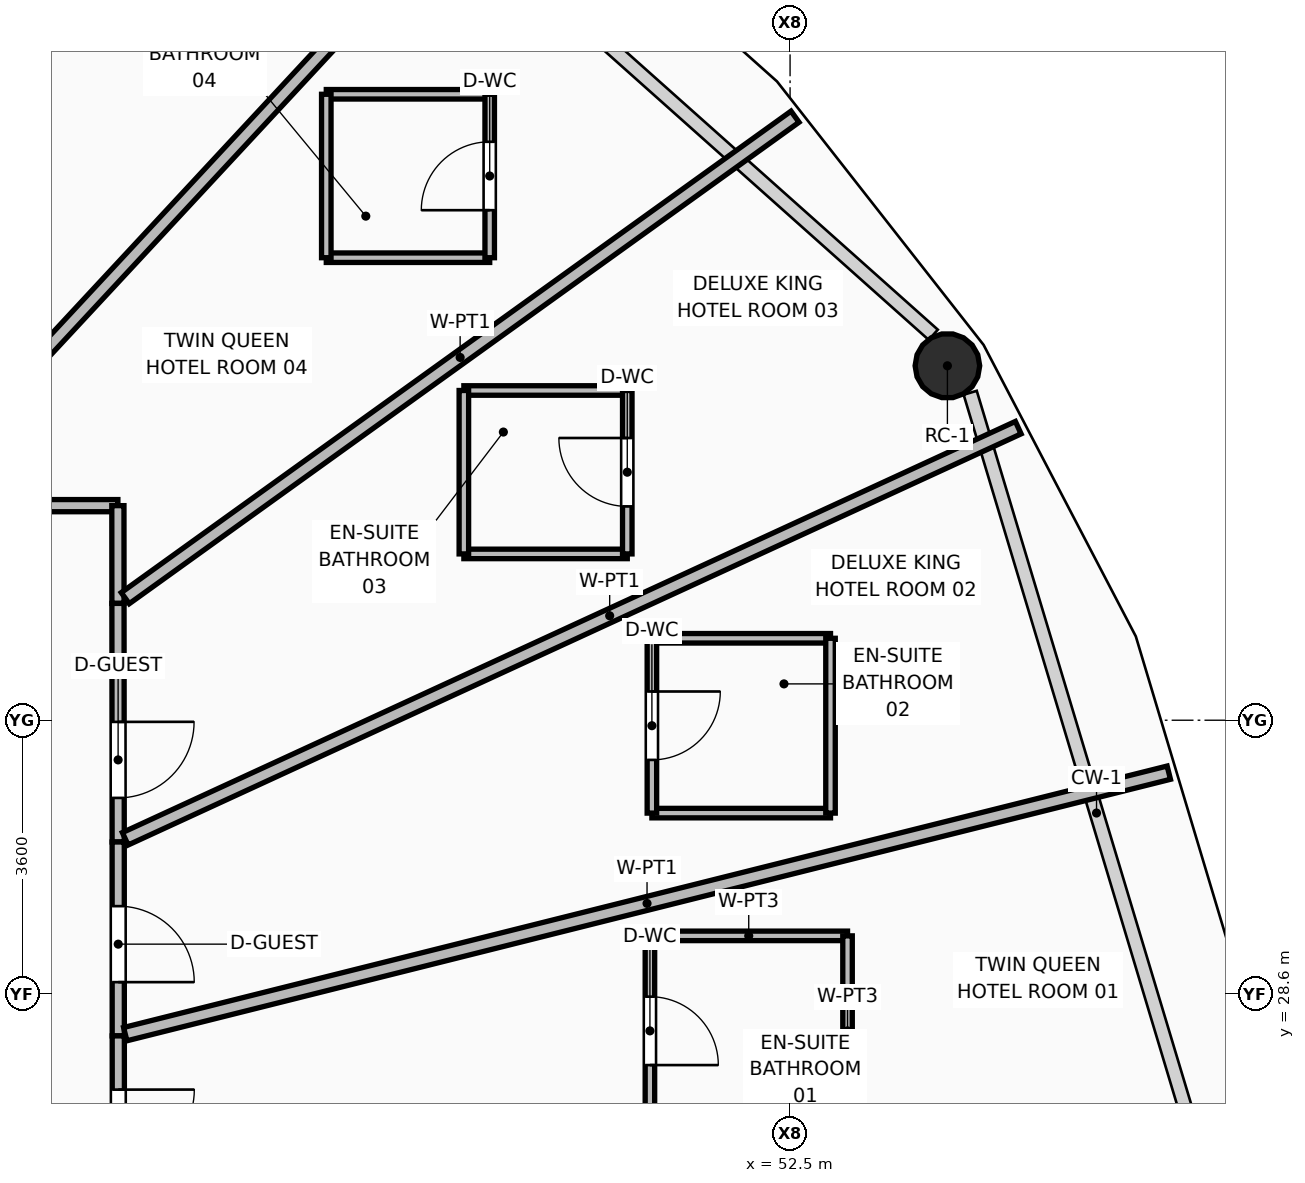
"""IFC4 building model, lengths in metres.
Left out: names, types, materials, properties, quantities, classifications, styles, units other than length and angle.
Written with IfcOpenShell. Run it as: python <this file> out.ifc"""

import sys

from ifc_helpers import new_model, si_unit, direction, frame, frame_2d, origin, origin_2d, place, context, subcontext, project, spatial, rectangle, hollow_circle, extrude, element, fill, save


model = new_model("IFC4")
c1 = context("Model", 3, precision=1e-05, world=origin(), true_north=direction((0.0, 1.0)))
c2 = subcontext(c1, "Body", "Model", "MODEL_VIEW")
j1 = project(units=[si_unit("LENGTHUNIT", "METRE"), si_unit("PLANEANGLEUNIT", "RADIAN")], contexts=[c1])
p1 = place(None, origin())
s1 = spatial("IfcSite", under=j1, at=p1, CompositionType="ELEMENT")
p2 = place(p1, origin())
s2 = spatial("IfcBuilding", under=s1, at=p2, CompositionType="ELEMENT")
p3 = place(p2, frame((0.0, 0.0, 53.25)))
s3 = spatial("IfcBuildingStorey", under=s2, at=p3, CompositionType="ELEMENT", Elevation=53.25)
p4 = place(p3, frame((54.57, 36.863, 0.0), z_axis=(0.192223999714, 0.099016391655, 0.976343017652), x_axis=(-0.45792701067, 0.888989793473, 0.0)))
e1 = element("IfcColumn", 1, at=p4, inside=s3, PredefinedType="COLUMN", context=c2, shape_type="SweptSolid", body=[
    extrude(hollow_circle(Radius=0.425, WallThickness=0.04, at=origin_2d()), origin(), (0.0, 0.0, 1.0), 3.656),
])
p5 = place(p3, frame((40.808, 35.023, 0.0), z_axis=(0.0, 0.0, 1.0), x_axis=(1.0, 0.0, 0.0)))
e2 = element("IfcWall", 2, at=p5, inside=s3, PredefinedType="PARTITIONING", context=c2, shape_type="SweptSolid", body=[
    extrude(rectangle(XDim=2.848, YDim=0.16, at=frame_2d((1.424, 0.0))), origin(), (0.0, 0.0, 1.0), 2.928),
])
p6 = place(p5, frame((0.716, 0.0, 0.0)))
e3 = element("IfcOpeningElement", 3, at=p6, cuts=e2, PredefinedType="OPENING", context=c2, shape_type="SweptSolid", body=[
    extrude(rectangle(XDim=1.0, YDim=2.1, at=frame_2d((0.5, 1.05))), frame((0.0, 0.09, 0.0), z_axis=(0.0, -1.0, 0.0), x_axis=(1.0, 0.0, 0.0)), (0.0, 0.0, 1.0), 0.18),
])
p7 = place(p3, frame((43.656, 35.023, 0.0), z_axis=(0.0, 0.0, 1.0), x_axis=(0.000759445386, -0.999999711621, 0.0)))
e4 = element("IfcWall", 4, at=p7, inside=s3, PredefinedType="PARTITIONING", context=c2, shape_type="SweptSolid", body=[
    extrude(rectangle(XDim=1.286, YDim=0.16, at=frame_2d((0.643, 0.0))), origin(), (0.0, 0.0, 1.0), 3.55),
])
p8 = place(p3, frame((43.657, 33.737, 0.0), z_axis=(0.0, 0.0, 1.0), x_axis=(0.000933270709, -0.999999564503, 0.0)))
e5 = element("IfcWall", 5, at=p8, inside=s3, PredefinedType="PARTITIONING", context=c2, shape_type="SweptSolid", body=[
    extrude(rectangle(XDim=3.139, YDim=0.16, at=frame_2d((1.57, 0.0))), origin(), (0.0, 0.0, 1.0), 2.928),
])
p9 = place(p8, frame((1.559, 0.0, 0.0)))
e6 = element("IfcOpeningElement", 6, at=p9, cuts=e5, PredefinedType="OPENING", context=c2, shape_type="SweptSolid", body=[
    extrude(rectangle(XDim=1.0, YDim=2.1, at=frame_2d((0.5, 1.05))), frame((0.0, 0.09, 0.0), z_axis=(0.0, -1.0, 0.0), x_axis=(1.0, 0.0, 0.0)), (0.0, 0.0, 1.0), 0.18),
])
p10 = place(p3, frame((43.66, 30.598, 0.0), z_axis=(0.0, 0.0, 1.0), x_axis=(0.000382848364, -0.999999926714, 0.0)))
e7 = element("IfcWall", 7, at=p10, inside=s3, PredefinedType="PARTITIONING", context=c2, shape_type="SweptSolid", body=[
    extrude(rectangle(XDim=2.551, YDim=0.16, at=frame_2d((1.275, 0.0))), origin(), (0.0, 0.0, 1.0), 3.55),
])
p11 = place(p10, frame((0.844, 0.0, 0.0)))
e8 = element("IfcOpeningElement", 8, at=p11, cuts=e7, PredefinedType="OPENING", context=c2, shape_type="SweptSolid", body=[
    extrude(rectangle(XDim=1.0, YDim=2.1, at=frame_2d((0.5, 1.05))), frame((0.0, 0.09, 0.0), z_axis=(0.0, -1.0, 0.0), x_axis=(1.0, 0.0, 0.0)), (0.0, 0.0, 1.0), 0.18),
])
p12 = place(p3, frame((43.661, 28.047, 0.0), z_axis=(0.0, 0.0, 1.0), x_axis=(0.000964526397, -0.999999534844, 0.0)))
e9 = element("IfcWall", 9, at=p12, inside=s3, PredefinedType="PARTITIONING", context=c2, shape_type="SweptSolid", body=[
    extrude(rectangle(XDim=2.278, YDim=0.16, at=frame_2d((1.139, 0.0))), origin(), (0.0, 0.0, 1.0), 3.55),
])
p13 = place(p12, frame((0.707, 0.0, 0.0)))
e10 = element("IfcOpeningElement", 10, at=p13, cuts=e9, PredefinedType="OPENING", context=c2, shape_type="SweptSolid", body=[
    extrude(rectangle(XDim=1.0, YDim=2.1, at=frame_2d((0.5, 1.05))), frame((0.0, 0.09, 0.0), z_axis=(0.0, -1.0, 0.0), x_axis=(1.0, 0.0, 0.0)), (0.0, 0.0, 1.0), 0.18),
])
p14 = place(p3, frame((43.753, 28.07, 0.0), z_axis=(0.0, 0.0, 1.0), x_axis=(0.970018590768, 0.243030725558, 0.0)))
e11 = element("IfcWall", 11, at=p14, inside=s3, PredefinedType="PARTITIONING", context=c2, shape_type="SweptSolid", body=[
    extrude(rectangle(XDim=14.154, YDim=0.18, at=frame_2d((7.077, 0.0))), origin(), (0.0, 0.0, 1.0), 2.775),
])
p15 = place(p3, frame((43.753, 30.64, 0.0), z_axis=(0.0, 0.0, 1.0), x_axis=(0.908354532473, 0.418200960466, 0.0)))
e12 = element("IfcWall", 12, at=p15, inside=s3, PredefinedType="PARTITIONING", context=c2, shape_type="SweptSolid", body=[
    extrude(rectangle(XDim=12.934, YDim=0.18, at=frame_2d((6.467, 0.0))), origin(), (0.0, 0.0, 1.0), 2.775),
])
p16 = place(p3, frame((43.753, 33.806, 0.0), z_axis=(0.0, 0.0, 1.0), x_axis=(0.812000044836, 0.583657371397, 0.0)))
e13 = element("IfcWall", 13, at=p16, inside=s3, PredefinedType="PARTITIONING", context=c2, shape_type="SweptSolid", body=[
    extrude(rectangle(XDim=10.852, YDim=0.18, at=frame_2d((5.426, 0.0))), origin(), (0.0, 0.0, 1.0), 2.775),
])
p17 = place(p3, frame((40.882, 35.103, 0.0), z_axis=(0.0, 0.0, 1.0), x_axis=(0.680551186201, 0.732700541122, 0.0)))
e14 = element("IfcWall", 14, at=p17, inside=s3, PredefinedType="PARTITIONING", context=c2, shape_type="SweptSolid", body=[
    extrude(rectangle(XDim=11.601, YDim=0.18, at=frame_2d((5.8, 0.0))), origin(), (0.0, 0.0, 1.0), 2.775),
])
p18 = place(p3, frame((37.445, 35.103, 0.0), z_axis=(0.0, 0.0, 1.0), x_axis=(0.507217216193, 0.861818249747, 0.0)))
e15 = element("IfcWall", 15, at=p18, inside=s3, PredefinedType="PARTITIONING", context=c2, shape_type="SweptSolid", body=[
    extrude(rectangle(XDim=13.046, YDim=0.18, at=frame_2d((6.523, 0.0))), origin(), (0.0, 0.0, 1.0), 2.775),
])
p19 = place(p3, frame((50.656, 29.363, 0.0), z_axis=(0.0, 0.0, 1.0), x_axis=(1.0, 0.0, 0.0)))
e16 = element("IfcWall", 16, at=p19, inside=s3, PredefinedType="PARTITIONING", context=c2, shape_type="SweptSolid", body=[
    extrude(rectangle(XDim=2.6, YDim=0.125, at=frame_2d((1.3, 0.0))), origin(), (0.0, 0.0, 1.0), 3.55),
])
p20 = place(p3, frame((50.656, 26.863, 0.0), z_axis=(0.0, 0.0, 1.0), x_axis=(0.0, 1.0, 0.0)))
e17 = element("IfcWall", 17, at=p20, inside=s3, PredefinedType="PARTITIONING", context=c2, shape_type="SweptSolid", body=[
    extrude(rectangle(XDim=2.5, YDim=0.125, at=frame_2d((1.25, 0.0))), origin(), (0.0, 0.0, 1.0), 3.55),
])
p21 = place(p20, frame((0.8, 0.0, 0.0)))
e18 = element("IfcOpeningElement", 18, at=p21, cuts=e17, PredefinedType="OPENING", context=c2, shape_type="SweptSolid", body=[
    extrude(rectangle(XDim=0.9, YDim=2.1, at=frame_2d((0.45, 1.05))), frame((0.0, 0.073, 0.0), z_axis=(0.0, -1.0, 0.0), x_axis=(1.0, 0.0, 0.0)), (0.0, 0.0, 1.0), 0.145),
])
p22 = place(p3, frame((53.256, 26.863, 0.0), z_axis=(0.0, 0.0, 1.0), x_axis=(0.0, 1.0, 0.0)))
e19 = element("IfcWall", 19, at=p22, inside=s3, PredefinedType="PARTITIONING", context=c2, shape_type="SweptSolid", body=[
    extrude(rectangle(XDim=2.5, YDim=0.125, at=frame_2d((1.25, 0.0))), origin(), (0.0, 0.0, 1.0), 3.55),
])
for number, where, z_axis, x_axis in (
    (20, (50.682, 30.978, 0.0), (0.0, 0.0, 1.0), (1.0, 0.0, 0.0)),
    (21, (50.682, 33.278, 0.0), (0.0, 0.0, 1.0), (1.0, 0.0, 0.0)),
):
    element("IfcWall", number, at=place(p3, frame(where, z_axis=z_axis, x_axis=x_axis)), inside=s3, PredefinedType="PARTITIONING", context=c2, shape_type="SweptSolid", body=[
        extrude(rectangle(XDim=2.35, YDim=0.125, at=frame_2d((1.175, 0.0))), origin(), (0.0, 0.0, 1.0), 3.55),
    ])
p23 = place(p3, frame((50.682, 30.978, 0.0), z_axis=(0.0, 0.0, 1.0), x_axis=(0.0, 1.0, 0.0)))
e22 = element("IfcWall", 22, at=p23, inside=s3, PredefinedType="PARTITIONING", context=c2, shape_type="SweptSolid", body=[
    extrude(rectangle(XDim=2.3, YDim=0.125, at=frame_2d((1.15, 0.0))), origin(), (0.0, 0.0, 1.0), 3.55),
])
p24 = place(p23, frame((0.7, 0.0, 0.0)))
e23 = element("IfcOpeningElement", 23, at=p24, cuts=e22, PredefinedType="OPENING", context=c2, shape_type="SweptSolid", body=[
    extrude(rectangle(XDim=0.9, YDim=2.1, at=frame_2d((0.45, 1.05))), frame((0.0, 0.073, 0.0), z_axis=(0.0, -1.0, 0.0), x_axis=(1.0, 0.0, 0.0)), (0.0, 0.0, 1.0), 0.145),
])
p25 = place(p3, frame((53.032, 30.978, 0.0), z_axis=(0.0, 0.0, 1.0), x_axis=(0.0, 1.0, 0.0)))
e24 = element("IfcWall", 24, at=p25, inside=s3, PredefinedType="PARTITIONING", context=c2, shape_type="SweptSolid", body=[
    extrude(rectangle(XDim=2.3, YDim=0.125, at=frame_2d((1.15, 0.0))), origin(), (0.0, 0.0, 1.0), 3.55),
])
for number, where, z_axis, x_axis in (
    (25, (48.208, 34.388, 0.0), (0.0, 0.0, 1.0), (1.0, 0.0, 0.0)),
    (26, (48.208, 36.538, 0.0), (0.0, 0.0, 1.0), (1.0, 0.0, 0.0)),
):
    element("IfcWall", number, at=place(p3, frame(where, z_axis=z_axis, x_axis=x_axis)), inside=s3, PredefinedType="PARTITIONING", context=c2, shape_type="SweptSolid", body=[
        extrude(rectangle(XDim=2.15, YDim=0.125, at=frame_2d((1.075, 0.0))), origin(), (0.0, 0.0, 1.0), 3.55),
    ])
p26 = place(p3, frame((48.208, 34.388, 0.0), z_axis=(0.0, 0.0, 1.0), x_axis=(0.0, 1.0, 0.0)))
e27 = element("IfcWall", 27, at=p26, inside=s3, PredefinedType="PARTITIONING", context=c2, shape_type="SweptSolid", body=[
    extrude(rectangle(XDim=2.15, YDim=0.125, at=frame_2d((1.075, 0.0))), origin(), (0.0, 0.0, 1.0), 2.928),
])
p27 = place(p3, frame((50.358, 34.388, 0.0), z_axis=(0.0, 0.0, 1.0), x_axis=(0.0, 1.0, 0.0)))
e28 = element("IfcWall", 28, at=p27, inside=s3, PredefinedType="PARTITIONING", context=c2, shape_type="SweptSolid", body=[
    extrude(rectangle(XDim=2.15, YDim=0.125, at=frame_2d((1.075, 0.0))), origin(), (0.0, 0.0, 1.0), 2.928),
])
p28 = place(p27, frame((0.625, 0.0, 0.0)))
e29 = element("IfcOpeningElement", 29, at=p28, cuts=e28, PredefinedType="OPENING", context=c2, shape_type="SweptSolid", body=[
    extrude(rectangle(XDim=0.9, YDim=2.1, at=frame_2d((0.45, 1.05))), frame((0.0, 0.073, 0.0), z_axis=(0.0, -1.0, 0.0), x_axis=(1.0, 0.0, 0.0)), (0.0, 0.0, 1.0), 0.145),
])
for number, where, z_axis, x_axis in (
    (30, (46.398, 38.285, 0.0), (0.0, 0.0, 1.0), (1.0, 0.0, 0.0)),
    (31, (46.398, 40.435, 0.0), (0.0, 0.0, 1.0), (1.0, 0.0, 0.0)),
    (32, (46.398, 38.285, 0.0), (0.0, 0.0, 1.0), (0.0, 1.0, 0.0)),
):
    element("IfcWall", number, at=place(p3, frame(where, z_axis=z_axis, x_axis=x_axis)), inside=s3, PredefinedType="PARTITIONING", context=c2, shape_type="SweptSolid", body=[
        extrude(rectangle(XDim=2.15, YDim=0.125, at=frame_2d((1.075, 0.0))), origin(), (0.0, 0.0, 1.0), 3.55),
    ])
p29 = place(p3, frame((48.548, 38.285, 0.0), z_axis=(0.0, 0.0, 1.0), x_axis=(0.0, 1.0, 0.0)))
e33 = element("IfcWall", 33, at=p29, inside=s3, PredefinedType="PARTITIONING", context=c2, shape_type="SweptSolid", body=[
    extrude(rectangle(XDim=2.15, YDim=0.125, at=frame_2d((1.075, 0.0))), origin(), (0.0, 0.0, 1.0), 3.55),
])
p30 = place(p29, frame((0.625, 0.0, 0.0)))
e34 = element("IfcOpeningElement", 34, at=p30, cuts=e33, PredefinedType="OPENING", context=c2, shape_type="SweptSolid", body=[
    extrude(rectangle(XDim=0.9, YDim=2.1, at=frame_2d((0.45, 1.05))), frame((0.0, 0.073, 0.0), z_axis=(0.0, -1.0, 0.0), x_axis=(1.0, 0.0, 0.0)), (0.0, 0.0, 1.0), 0.145),
])
p31 = place(p21, frame((0.9, 0.0, 0.0), z_axis=(0.0, 0.0, 1.0), x_axis=(-1.0, 0.0, 0.0)))
e35 = element("IfcDoor", 35, at=p31, inside=s3, OperationType="SINGLE_SWING_RIGHT", PredefinedType="DOOR", context=c2, shape_type="SweptSolid", body=[
    extrude(rectangle(XDim=0.9, YDim=2.1, at=frame_2d((0.45, 1.05))), frame((0.0, 0.025, 0.0), z_axis=(0.0, -1.0, 0.0), x_axis=(1.0, 0.0, 0.0)), (0.0, 0.0, 1.0), 0.05),
])
fill(e18, e35)
p32 = place(p13, origin())
e36 = element("IfcDoor", 36, at=p32, inside=s3, OperationType="SINGLE_SWING_LEFT", PredefinedType="DOOR", context=c2, shape_type="SweptSolid", body=[
    extrude(rectangle(XDim=1.0, YDim=2.1, at=frame_2d((0.5, 1.05))), frame((0.0, 0.025, 0.0), z_axis=(0.0, -1.0, 0.0), x_axis=(1.0, 0.0, 0.0)), (0.0, 0.0, 1.0), 0.05),
])
fill(e10, e36)
p33 = place(p24, frame((0.9, 0.0, 0.0), z_axis=(0.0, 0.0, 1.0), x_axis=(-1.0, 0.0, 0.0)))
e37 = element("IfcDoor", 37, at=p33, inside=s3, OperationType="SINGLE_SWING_LEFT", PredefinedType="DOOR", context=c2, shape_type="SweptSolid", body=[
    extrude(rectangle(XDim=0.9, YDim=2.1, at=frame_2d((0.45, 1.05))), frame((0.0, 0.025, 0.0), z_axis=(0.0, -1.0, 0.0), x_axis=(1.0, 0.0, 0.0)), (0.0, 0.0, 1.0), 0.05),
])
fill(e23, e37)
p34 = place(p11, origin())
e38 = element("IfcDoor", 38, at=p34, inside=s3, OperationType="SINGLE_SWING_RIGHT", PredefinedType="DOOR", context=c2, shape_type="SweptSolid", body=[
    extrude(rectangle(XDim=1.0, YDim=2.1, at=frame_2d((0.5, 1.05))), frame((0.0, 0.025, 0.0), z_axis=(0.0, -1.0, 0.0), x_axis=(1.0, 0.0, 0.0)), (0.0, 0.0, 1.0), 0.05),
])
fill(e8, e38)
p35 = place(p28, origin())
e39 = element("IfcDoor", 39, at=p35, inside=s3, OperationType="SINGLE_SWING_RIGHT", PredefinedType="DOOR", context=c2, shape_type="SweptSolid", body=[
    extrude(rectangle(XDim=0.9, YDim=2.1, at=frame_2d((0.45, 1.05))), frame((0.0, 0.025, 0.0), z_axis=(0.0, -1.0, 0.0), x_axis=(1.0, 0.0, 0.0)), (0.0, 0.0, 1.0), 0.05),
])
fill(e29, e39)
p36 = place(p9, origin())
e40 = element("IfcDoor", 40, at=p36, inside=s3, OperationType="SINGLE_SWING_LEFT", PredefinedType="DOOR", context=c2, shape_type="SweptSolid", body=[
    extrude(rectangle(XDim=1.0, YDim=2.1, at=frame_2d((0.5, 1.05))), frame((0.0, 0.025, 0.0), z_axis=(0.0, -1.0, 0.0), x_axis=(1.0, 0.0, 0.0)), (0.0, 0.0, 1.0), 0.05),
])
fill(e6, e40)
p37 = place(p30, origin())
e41 = element("IfcDoor", 41, at=p37, inside=s3, OperationType="SINGLE_SWING_LEFT", PredefinedType="DOOR", context=c2, shape_type="SweptSolid", body=[
    extrude(rectangle(XDim=0.9, YDim=2.1, at=frame_2d((0.45, 1.05))), frame((0.0, 0.025, 0.0), z_axis=(0.0, -1.0, 0.0), x_axis=(1.0, 0.0, 0.0)), (0.0, 0.0, 1.0), 0.05),
])
fill(e34, e41)
save(model, sys.argv[1])
